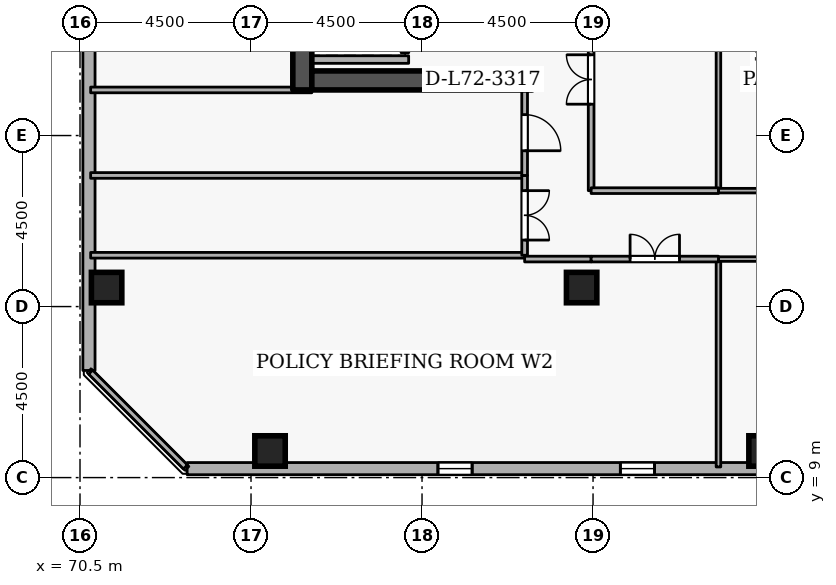
"""IFC4 building model, lengths in metres.
Left out: names, types, materials, properties, quantities, classifications, styles, units other than length and angle.
Written with IfcOpenShell. Run it as: python <this file> out.ifc"""

import sys

from ifc_helpers import new_model, si_unit, direction, frame, frame_2d, origin, origin_2d, place, context, subcontext, project, spatial, rectangle, extrude, element, fill, save


model = new_model("IFC4")
c1 = context("Model", 3, precision=1e-05, world=origin(), true_north=direction((0.0, 1.0)))
c2 = subcontext(c1, "Body", "Model", "MODEL_VIEW")
j1 = project(units=[si_unit("LENGTHUNIT", "METRE"), si_unit("PLANEANGLEUNIT", "RADIAN")], contexts=[c1])
p1 = place(None, origin())
s1 = spatial("IfcSite", under=j1, at=p1, CompositionType="ELEMENT")
p2 = place(p1, origin())
s2 = spatial("IfcBuilding", under=s1, at=p2, CompositionType="ELEMENT")
p3 = place(p2, frame((0.0, 0.0, 269.1)))
s3 = spatial("IfcBuildingStorey", under=s2, at=p3, CompositionType="ELEMENT", Elevation=269.1)
p4 = place(p3, frame((76.35, 19.2, 0.0), z_axis=(0.0, 0.0, 1.0), x_axis=(0.0, 1.0, 0.0)))
e1 = element("IfcWall", 1, at=p4, inside=s3, PredefinedType="SHEAR", context=c2, shape_type="SweptSolid", body=[
    extrude(rectangle(XDim=15.6, YDim=0.5, at=frame_2d((7.8, 0.0))), origin(), (0.0, 0.0, 1.0), 3.6),
])
p5 = place(p3, frame((76.6, 19.45, 0.0), z_axis=(0.0, 0.0, 1.0), x_axis=(1.0, 0.0, 0.0)))
e2 = element("IfcWall", 2, at=p5, inside=s3, PredefinedType="SHEAR", context=c2, shape_type="SweptSolid", body=[
    extrude(rectangle(XDim=5.8, YDim=0.5, at=frame_2d((2.9, 0.0))), origin(), (0.0, 0.0, 1.0), 3.6),
])
for number, where, z_axis, x_axis in (
    (3, (71.2, 14.0, 0.0), (0.0, 0.0, 1.0), (1.0, 0.0, 0.0)),
    (4, (88.5, 9.7, 0.0), (0.0, 0.0, 1.0), (1.0, 0.0, 0.0)),
    (5, (75.5, 9.7, 0.0), (0.0, 0.0, 1.0), (1.0, 0.0, 0.0)),
    (6, (83.7, 14.0, 0.0), (0.0, 0.0, 1.0), (1.0, 0.0, 0.0)),
):
    element("IfcColumn", number, at=place(p3, frame(where, z_axis=z_axis, x_axis=x_axis)), inside=s3, PredefinedType="COLUMN", context=c2, shape_type="SweptSolid", body=[
        extrude(rectangle(XDim=0.8, YDim=0.8, at=origin_2d()), origin(), (0.0, 0.0, 1.0), 3.6),
    ])
p6 = place(p3, frame((73.319, 9.235, 0.0), z_axis=(0.0, 0.0, 1.0), x_axis=(0.999999998513, 5.4540124e-05, 0.0)))
e7 = element("IfcWall", 7, at=p6, inside=s3, PredefinedType="STANDARD", context=c2, shape_type="SweptSolid", body=[
    extrude(rectangle(XDim=35.811, YDim=0.32, at=frame_2d((17.905, 0.0))), origin(), (0.0, 0.0, 1.0), 2.7),
])
p7 = place(p6, frame((6.6, 0.0, 0.72)))
e8 = element("IfcOpeningElement", 8, at=p7, cuts=e7, PredefinedType="OPENING", context=c2, shape_type="SweptSolid", body=[
    extrude(rectangle(XDim=0.9, YDim=1.75, at=frame_2d((0.45, 0.875))), frame((0.0, 0.17, 0.0), z_axis=(0.0, -1.0, 0.0), x_axis=(1.0, 0.0, 0.0)), (0.0, 0.0, 1.0), 0.34),
])
p8 = place(p6, frame((11.4, 0.0, 0.72)))
e9 = element("IfcOpeningElement", 9, at=p8, cuts=e7, PredefinedType="OPENING", context=c2, shape_type="SweptSolid", body=[
    extrude(rectangle(XDim=0.9, YDim=1.75, at=frame_2d((0.45, 0.875))), frame((0.0, 0.17, 0.0), z_axis=(0.0, -1.0, 0.0), x_axis=(1.0, 0.0, 0.0)), (0.0, 0.0, 1.0), 0.34),
])
p9 = place(p6, frame((21.0, 0.0, 0.72)))
e10 = element("IfcOpeningElement", 10, at=p9, cuts=e7, PredefinedType="OPENING", context=c2, shape_type="SweptSolid", body=[
    extrude(rectangle(XDim=0.9, YDim=1.75, at=frame_2d((0.45, 0.875))), frame((0.0, 0.17, 0.0), z_axis=(0.0, -1.0, 0.0), x_axis=(1.0, 0.0, 0.0)), (0.0, 0.0, 1.0), 0.34),
])
p10 = place(p6, frame((25.8, 0.0, 0.72)))
e11 = element("IfcOpeningElement", 11, at=p10, cuts=e7, PredefinedType="OPENING", context=c2, shape_type="SweptSolid", body=[
    extrude(rectangle(XDim=0.9, YDim=1.75, at=frame_2d((0.45, 0.875))), frame((0.0, 0.17, 0.0), z_axis=(0.0, -1.0, 0.0), x_axis=(1.0, 0.0, 0.0)), (0.0, 0.0, 1.0), 0.34),
])
p11 = place(p6, frame((30.6, 0.0, 0.72)))
e12 = element("IfcOpeningElement", 12, at=p11, cuts=e7, PredefinedType="OPENING", context=c2, shape_type="SweptSolid", body=[
    extrude(rectangle(XDim=0.9, YDim=1.75, at=frame_2d((0.45, 0.875))), frame((0.0, 0.17, 0.0), z_axis=(0.0, -1.0, 0.0), x_axis=(1.0, 0.0, 0.0)), (0.0, 0.0, 1.0), 0.34),
])
p12 = place(p3, frame((70.737, 47.629, 0.0), z_axis=(0.0, 0.0, 1.0), x_axis=(-5.4540124e-05, -0.999999998513, 0.0)))
e13 = element("IfcWall", 13, at=p12, inside=s3, PredefinedType="STANDARD", context=c2, shape_type="SweptSolid", body=[
    extrude(rectangle(XDim=35.811, YDim=0.32, at=frame_2d((17.905, 0.0))), origin(), (0.0, 0.0, 1.0), 2.7),
])
p13 = place(p12, frame((1.8, 0.0, 0.72)))
e14 = element("IfcOpeningElement", 14, at=p13, cuts=e13, PredefinedType="OPENING", context=c2, shape_type="SweptSolid", body=[
    extrude(rectangle(XDim=0.9, YDim=1.75, at=frame_2d((0.45, 0.875))), frame((0.0, 0.17, 0.0), z_axis=(0.0, -1.0, 0.0), x_axis=(1.0, 0.0, 0.0)), (0.0, 0.0, 1.0), 0.34),
])
p14 = place(p12, frame((11.4, 0.0, 0.72)))
e15 = element("IfcOpeningElement", 15, at=p14, cuts=e13, PredefinedType="OPENING", context=c2, shape_type="SweptSolid", body=[
    extrude(rectangle(XDim=0.9, YDim=1.75, at=frame_2d((0.45, 0.875))), frame((0.0, 0.17, 0.0), z_axis=(0.0, -1.0, 0.0), x_axis=(1.0, 0.0, 0.0)), (0.0, 0.0, 1.0), 0.34),
])
p15 = place(p12, frame((16.2, 0.0, 0.72)))
e16 = element("IfcOpeningElement", 16, at=p15, cuts=e13, PredefinedType="OPENING", context=c2, shape_type="SweptSolid", body=[
    extrude(rectangle(XDim=0.9, YDim=1.75, at=frame_2d((0.45, 0.875))), frame((0.0, 0.17, 0.0), z_axis=(0.0, -1.0, 0.0), x_axis=(1.0, 0.0, 0.0)), (0.0, 0.0, 1.0), 0.34),
])
p16 = place(p12, frame((25.8, 0.0, 0.72)))
e17 = element("IfcOpeningElement", 17, at=p16, cuts=e13, PredefinedType="OPENING", context=c2, shape_type="SweptSolid", body=[
    extrude(rectangle(XDim=0.9, YDim=1.75, at=frame_2d((0.45, 0.875))), frame((0.0, 0.17, 0.0), z_axis=(0.0, -1.0, 0.0), x_axis=(1.0, 0.0, 0.0)), (0.0, 0.0, 1.0), 0.34),
])
p17 = place(p3, frame((79.05, 20.18, 0.0), z_axis=(0.0, 0.0, 1.0), x_axis=(0.0, 1.0, 0.0)))
e18 = element("IfcWall", 18, at=p17, inside=s3, PredefinedType="STANDARD", context=c2, shape_type="SweptSolid", body=[
    extrude(rectangle(XDim=1.94, YDim=0.2, at=frame_2d((0.97, 0.0))), origin(), (0.0, 0.0, 1.0), 3.34),
])
p18 = place(p17, frame((0.46, 0.0, 0.0)))
e19 = element("IfcOpeningElement", 19, at=p18, cuts=e18, PredefinedType="OPENING", context=c2, shape_type="SweptSolid", body=[
    extrude(rectangle(XDim=1.02, YDim=2.06, at=frame_2d((0.51, 1.03))), frame((0.0, 0.11, 0.0), z_axis=(0.0, -1.0, 0.0), x_axis=(1.0, 0.0, 0.0)), (0.0, 0.0, 1.0), 0.22),
])
p19 = place(p3, frame((76.612, 20.0, 0.0), z_axis=(0.0, 0.0, 1.0), x_axis=(1.0, 0.0, 0.0)))
e20 = element("IfcWall", 20, at=p19, inside=s3, PredefinedType="STANDARD", context=c2, shape_type="SweptSolid", body=[
    extrude(rectangle(XDim=2.536, YDim=0.2, at=frame_2d((1.268, 0.0))), origin(), (0.0, 0.0, 1.0), 3.34),
])
for number, where, z_axis, x_axis in (
    (21, (82.2, 14.85, 0.0), (0.0, 0.0, 1.0), (-1.0, 0.0, 0.0)),
    (22, (70.78, 16.95, 0.0), (0.0, 0.0, 1.0), (1.0, 0.0, 0.0)),
):
    element("IfcWall", number, at=place(p3, frame(where, z_axis=z_axis, x_axis=x_axis)), inside=s3, PredefinedType="PARTITIONING", context=c2, shape_type="SweptSolid", body=[
        extrude(rectangle(XDim=11.42, YDim=0.15, at=frame_2d((5.71, 0.0))), origin(), (0.0, 0.0, 1.0), 3.34),
    ])
p20 = place(p3, frame((82.2, 16.95, 0.0), z_axis=(0.0, 0.0, 1.0), x_axis=(0.0, -1.0, 0.0)))
e23 = element("IfcWall", 23, at=p20, inside=s3, PredefinedType="PARTITIONING", context=c2, shape_type="SweptSolid", body=[
    extrude(rectangle(XDim=2.1, YDim=0.15, at=frame_2d((1.05, 0.0))), origin(), (0.0, 0.0, 1.0), 3.34),
])
p21 = place(p20, frame((0.4, 0.0, 0.0)))
e24 = element("IfcOpeningElement", 24, at=p21, cuts=e23, PredefinedType="OPENING", context=c2, shape_type="SweptSolid", body=[
    extrude(rectangle(XDim=1.3, YDim=2.12, at=frame_2d((0.65, 1.06))), frame((0.0, 0.085, 0.0), z_axis=(0.0, -1.0, 0.0), x_axis=(1.0, 0.0, 0.0)), (0.0, 0.0, 1.0), 0.17),
])
p22 = place(p3, frame((70.78, 19.2, 0.0), z_axis=(0.0, 0.0, 1.0), x_axis=(1.0, 0.0, 0.0)))
e25 = element("IfcWall", 25, at=p22, inside=s3, PredefinedType="PARTITIONING", context=c2, shape_type="SweptSolid", body=[
    extrude(rectangle(XDim=5.82, YDim=0.15, at=frame_2d((2.91, 0.0))), origin(), (0.0, 0.0, 1.0), 2.545),
])
p23 = place(p3, frame((82.2, 19.2, 0.0), z_axis=(0.0, 0.0, 1.0), x_axis=(0.0, -1.0, 0.0)))
e26 = element("IfcWall", 26, at=p23, inside=s3, PredefinedType="PARTITIONING", context=c2, shape_type="SweptSolid", body=[
    extrude(rectangle(XDim=2.25, YDim=0.15, at=frame_2d((1.125, 0.0))), origin(), (0.0, 0.0, 1.0), 3.34),
])
p24 = place(p23, frame((0.65, 0.0, 0.0)))
e27 = element("IfcOpeningElement", 27, at=p24, cuts=e26, PredefinedType="OPENING", context=c2, shape_type="SweptSolid", body=[
    extrude(rectangle(XDim=0.95, YDim=2.1, at=frame_2d((0.475, 1.05))), frame((0.0, 0.085, 0.0), z_axis=(0.0, -1.0, 0.0), x_axis=(1.0, 0.0, 0.0)), (0.0, 0.0, 1.0), 0.17),
])
p25 = place(p3, frame((87.3, 9.28, 0.0), z_axis=(0.0, 0.0, 1.0), x_axis=(0.0, 1.0, 0.0)))
e28 = element("IfcWall", 28, at=p25, inside=s3, PredefinedType="PARTITIONING", context=c2, shape_type="SweptSolid", body=[
    extrude(rectangle(XDim=5.47, YDim=0.12, at=frame_2d((2.735, 0.0))), origin(), (0.0, 0.0, 1.0), 3.34),
])
p26 = place(p3, frame((87.3, 14.75, 0.0), z_axis=(0.0, 0.0, 1.0), x_axis=(1.0, 0.0, 0.0)))
e29 = element("IfcWall", 29, at=p26, inside=s3, PredefinedType="PARTITIONING", context=c2, shape_type="SweptSolid", body=[
    extrude(rectangle(XDim=5.75, YDim=0.12, at=frame_2d((2.875, 0.0))), origin(), (0.0, 0.0, 1.0), 3.34),
])
p27 = place(p26, frame((2.35, 0.0, 0.0)))
e30 = element("IfcOpeningElement", 30, at=p27, cuts=e29, PredefinedType="OPENING", context=c2, shape_type="SweptSolid", body=[
    extrude(rectangle(XDim=1.05, YDim=2.1, at=frame_2d((0.525, 1.05))), frame((0.0, 0.07, 0.0), z_axis=(0.0, -1.0, 0.0), x_axis=(1.0, 0.0, 0.0)), (0.0, 0.0, 1.0), 0.14),
])
p28 = place(p3, frame((73.275, 9.28, 0.0), z_axis=(0.0, 0.0, 1.0), x_axis=(-0.707106781187, 0.707106781187, 0.0)))
e31 = element("IfcWall", 31, at=p28, inside=s3, PredefinedType="PARTITIONING", context=c2, shape_type="SweptSolid", body=[
    extrude(rectangle(XDim=3.528, YDim=0.15, at=frame_2d((1.764, 0.0))), origin(), (0.0, 0.0, 1.0), 3.34),
])
p29 = place(p3, frame((82.2, 14.75, 0.0), z_axis=(0.0, 0.0, 1.0), x_axis=(1.0, 0.0, 0.0)))
e32 = element("IfcWall", 32, at=p29, inside=s3, PredefinedType="PARTITIONING", context=c2, shape_type="SweptSolid", body=[
    extrude(rectangle(XDim=1.75, YDim=0.15, at=frame_2d((0.875, 0.0))), origin(), (0.0, 0.0, 1.0), 3.34),
])
p30 = place(p3, frame((83.95, 14.75, 0.0), z_axis=(0.0, 0.0, 1.0), x_axis=(1.0, 0.0, 0.0)))
e33 = element("IfcWall", 33, at=p30, inside=s3, PredefinedType="PARTITIONING", context=c2, shape_type="SweptSolid", body=[
    extrude(rectangle(XDim=3.35, YDim=0.15, at=frame_2d((1.675, 0.0))), origin(), (0.0, 0.0, 1.0), 3.34),
])
p31 = place(p30, frame((1.025, 0.0, 0.0)))
e34 = element("IfcOpeningElement", 34, at=p31, cuts=e33, PredefinedType="OPENING", context=c2, shape_type="SweptSolid", body=[
    extrude(rectangle(XDim=1.3, YDim=2.12, at=frame_2d((0.65, 1.06))), frame((0.0, 0.085, 0.0), z_axis=(0.0, -1.0, 0.0), x_axis=(1.0, 0.0, 0.0)), (0.0, 0.0, 1.0), 0.17),
])
p32 = place(p3, frame((87.3, 16.55, 0.0), z_axis=(0.0, 0.0, 1.0), x_axis=(0.0, 1.0, 0.0)))
e35 = element("IfcWall", 35, at=p32, inside=s3, PredefinedType="PARTITIONING", context=c2, shape_type="SweptSolid", body=[
    extrude(rectangle(XDim=5.85, YDim=0.12, at=frame_2d((2.925, 0.0))), origin(), (0.0, 0.0, 1.0), 3.34),
])
p33 = place(p3, frame((93.05, 16.55, 0.0), z_axis=(0.0, 0.0, 1.0), x_axis=(-1.0, 0.0, 0.0)))
e36 = element("IfcWall", 36, at=p33, inside=s3, PredefinedType="PARTITIONING", context=c2, shape_type="SweptSolid", body=[
    extrude(rectangle(XDim=5.75, YDim=0.12, at=frame_2d((2.875, 0.0))), origin(), (0.0, 0.0, 1.0), 3.34),
])
p34 = place(p3, frame((83.95, 16.55, 0.0), z_axis=(0.0, 0.0, 1.0), x_axis=(0.0, 1.0, 0.0)))
e37 = element("IfcWall", 37, at=p34, inside=s3, PredefinedType="PARTITIONING", context=c2, shape_type="SweptSolid", body=[
    extrude(rectangle(XDim=5.85, YDim=0.15, at=frame_2d((2.925, 0.0))), origin(), (0.0, 0.0, 1.0), 3.34),
])
p35 = place(p34, frame((2.275, 0.0, 0.0)))
e38 = element("IfcOpeningElement", 38, at=p35, cuts=e37, PredefinedType="OPENING", context=c2, shape_type="SweptSolid", body=[
    extrude(rectangle(XDim=1.3, YDim=2.12, at=frame_2d((0.65, 1.06))), frame((0.0, 0.085, 0.0), z_axis=(0.0, -1.0, 0.0), x_axis=(1.0, 0.0, 0.0)), (0.0, 0.0, 1.0), 0.17),
])
p36 = place(p3, frame((87.3, 16.55, 0.0), z_axis=(0.0, 0.0, 1.0), x_axis=(-1.0, 0.0, 0.0)))
e39 = element("IfcWall", 39, at=p36, inside=s3, PredefinedType="PARTITIONING", context=c2, shape_type="SweptSolid", body=[
    extrude(rectangle(XDim=3.35, YDim=0.15, at=frame_2d((1.675, 0.0))), origin(), (0.0, 0.0, 1.0), 3.34),
])
p37 = place(p7, origin())
e40 = element("IfcWindow", 40, at=p37, inside=s3, PartitioningType="SINGLE_PANEL", PredefinedType="WINDOW", context=c2, shape_type="SweptSolid", body=[
    extrude(rectangle(XDim=0.9, YDim=1.75, at=frame_2d((0.45, 0.875))), frame((0.0, 0.03, 0.0), z_axis=(0.0, -1.0, 0.0), x_axis=(1.0, 0.0, 0.0)), (0.0, 0.0, 1.0), 0.06),
])
fill(e8, e40)
p38 = place(p8, origin())
e41 = element("IfcWindow", 41, at=p38, inside=s3, PartitioningType="SINGLE_PANEL", PredefinedType="WINDOW", context=c2, shape_type="SweptSolid", body=[
    extrude(rectangle(XDim=0.9, YDim=1.75, at=frame_2d((0.45, 0.875))), frame((0.0, 0.03, 0.0), z_axis=(0.0, -1.0, 0.0), x_axis=(1.0, 0.0, 0.0)), (0.0, 0.0, 1.0), 0.06),
])
fill(e9, e41)
p39 = place(p21, origin())
e42 = element("IfcDoor", 42, at=p39, inside=s3, OperationType="DOUBLE_DOOR_SINGLE_SWING", PredefinedType="DOOR", context=c2, shape_type="SweptSolid", body=[
    extrude(rectangle(XDim=1.3, YDim=2.12, at=frame_2d((0.65, 1.06))), frame((0.0, 0.025, 0.0), z_axis=(0.0, -1.0, 0.0), x_axis=(1.0, 0.0, 0.0)), (0.0, 0.0, 1.0), 0.05),
])
fill(e24, e42)
p40 = place(p24, origin())
e43 = element("IfcDoor", 43, at=p40, inside=s3, OperationType="SINGLE_SWING_RIGHT", PredefinedType="DOOR", context=c2, shape_type="SweptSolid", body=[
    extrude(rectangle(XDim=0.95, YDim=2.1, at=frame_2d((0.475, 1.05))), frame((0.0, 0.025, 0.0), z_axis=(0.0, -1.0, 0.0), x_axis=(1.0, 0.0, 0.0)), (0.0, 0.0, 1.0), 0.05),
])
fill(e27, e43)
p41 = place(p31, origin())
e44 = element("IfcDoor", 44, at=p41, inside=s3, OperationType="DOUBLE_DOOR_SINGLE_SWING", PredefinedType="DOOR", context=c2, shape_type="SweptSolid", body=[
    extrude(rectangle(XDim=1.3, YDim=2.12, at=frame_2d((0.65, 1.06))), frame((0.0, 0.025, 0.0), z_axis=(0.0, -1.0, 0.0), x_axis=(1.0, 0.0, 0.0)), (0.0, 0.0, 1.0), 0.05),
])
fill(e34, e44)
p42 = place(p35, origin())
e45 = element("IfcDoor", 45, at=p42, inside=s3, OperationType="DOUBLE_DOOR_SINGLE_SWING", PredefinedType="DOOR", context=c2, shape_type="SweptSolid", body=[
    extrude(rectangle(XDim=1.3, YDim=2.12, at=frame_2d((0.65, 1.06))), frame((0.0, 0.025, 0.0), z_axis=(0.0, -1.0, 0.0), x_axis=(1.0, 0.0, 0.0)), (0.0, 0.0, 1.0), 0.05),
])
fill(e38, e45)
save(model, sys.argv[1])
